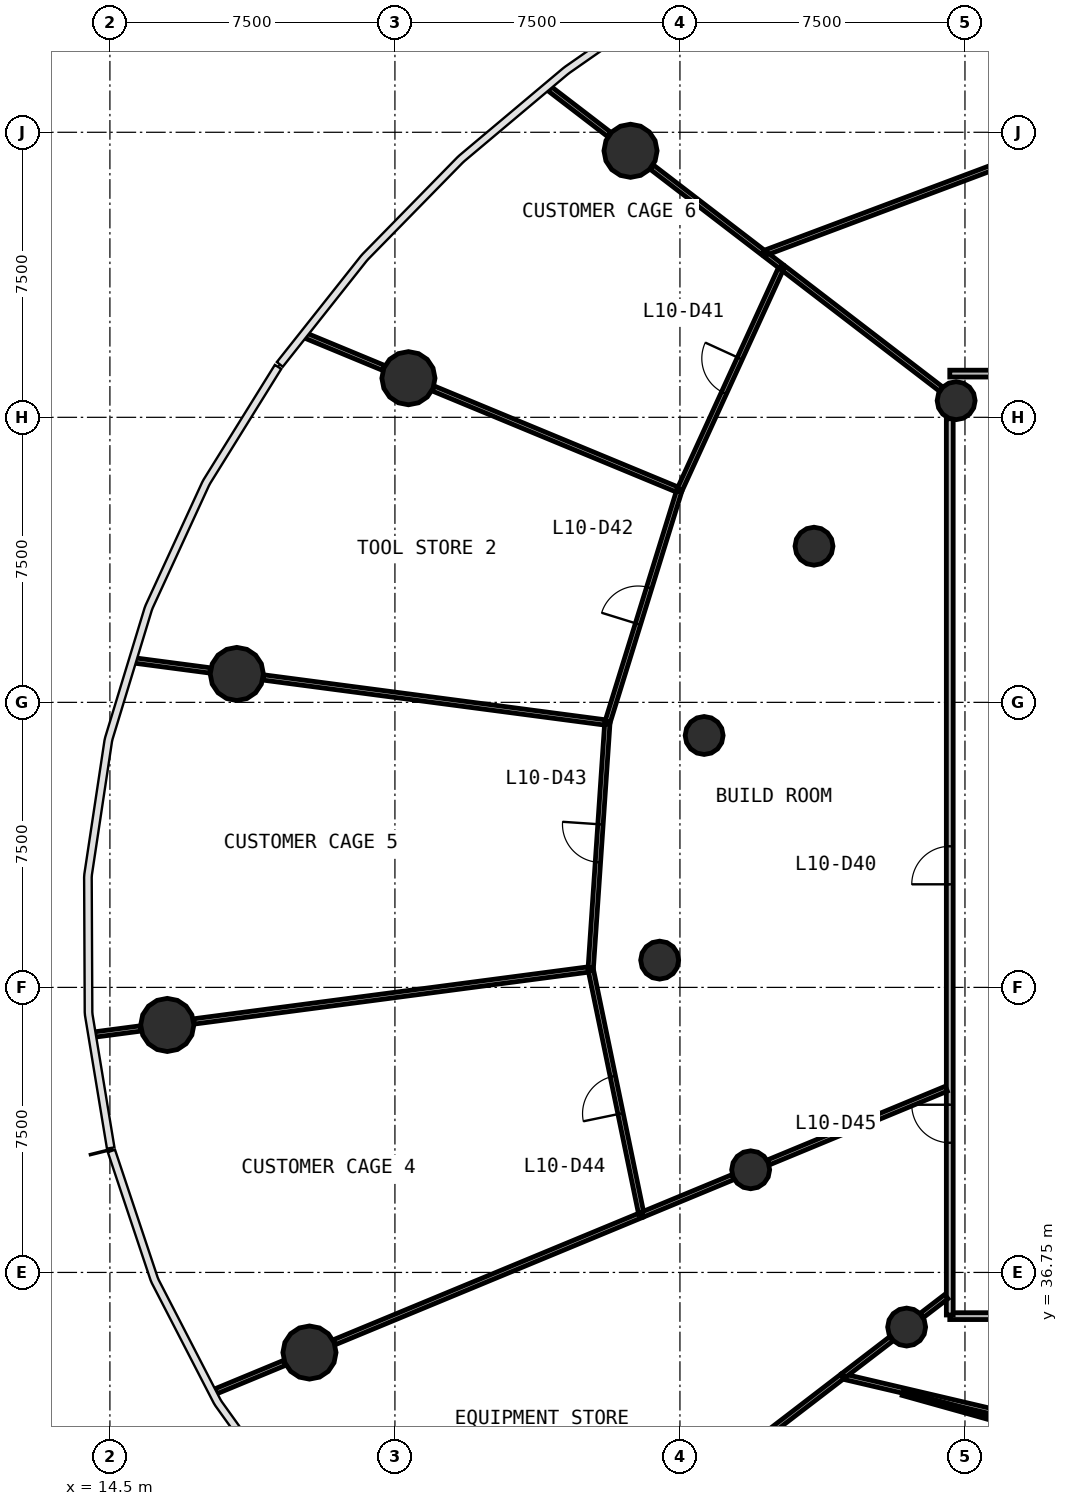
"""IFC4 building model, lengths in metres.
Left out: names, types, materials, properties, quantities, classifications, styles, units other than length and angle.
Written with IfcOpenShell. Run it as: python <this file> out.ifc"""

import sys

from ifc_helpers import new_model, si_unit, direction, frame, frame_2d, origin, origin_2d, place, context, subcontext, project, spatial, rectangle, circle, extrude, source, transform, mapped, element, fill, save


model = new_model("IFC4")
c1 = context("Model", 3, precision=1e-05, world=origin(), true_north=direction((0.0, 1.0)))
c2 = subcontext(c1, "Body", "Model", "MODEL_VIEW")
j1 = project(units=[si_unit("LENGTHUNIT", "METRE"), si_unit("PLANEANGLEUNIT", "RADIAN")], contexts=[c1])
p1 = place(None, origin())
s1 = spatial("IfcSite", under=j1, at=p1, CompositionType="ELEMENT")
p2 = place(p1, origin())
s2 = spatial("IfcBuilding", under=s1, at=p2, CompositionType="ELEMENT")
p3 = place(p2, frame((0.0, 0.0, 44.6)))
s3 = spatial("IfcBuildingStorey", under=s2, at=p3, CompositionType="ELEMENT", Elevation=44.6)
m1 = source(origin(), c2, "Body", "SweptSolid", [
    extrude(circle(Radius=0.7, at=origin_2d()), origin(), (0.0, 0.0, 1.0), 4.4),
])
for number, where, z_axis, x_axis in (
    (1, (28.199, 66.263, 0.0), (0.0, 0.0, 1.0), (1.0, 0.0, 0.0)),
    (2, (22.355, 60.279, 0.0), (0.0, 0.0, 1.0), (1.0, 0.0, 0.0)),
    (3, (17.839, 52.497, 0.0), (0.0, 0.0, 1.0), (1.0, 0.0, 0.0)),
    (4, (16.01, 43.262, 0.0), (0.0, 0.0, 1.0), (1.0, 0.0, 0.0)),
    (5, (19.751, 34.642, 0.0), (0.0, 0.0, 1.0), (1.0, 0.0, 0.0)),
):
    element("IfcColumn", number, at=place(p3, frame(where, z_axis=z_axis, x_axis=x_axis)), inside=s3, PredefinedType="COLUMN", context=c2, shape_type="MappedRepresentation", body=[
        mapped(m1, transform((0.0, 0.0, 0.0), scale=1.0)),
    ])
m2 = source(origin(), c2, "Body", "SweptSolid", [
    extrude(circle(Radius=0.5, at=origin_2d()), origin(), (0.0, 0.0, 1.0), 4.4),
])
for number, where, z_axis, x_axis in (
    (6, (36.768, 59.688, 0.0), (0.0, 0.0, 1.0), (1.0, 0.0, 0.0)),
    (7, (33.028, 55.859, 0.0), (0.0, 0.0, 1.0), (1.0, 0.0, 0.0)),
    (8, (30.137, 50.878, 0.0), (0.0, 0.0, 1.0), (1.0, 0.0, 0.0)),
    (9, (28.966, 44.968, 0.0), (0.0, 0.0, 1.0), (1.0, 0.0, 0.0)),
    (10, (31.361, 39.451, 0.0), (0.0, 0.0, 1.0), (1.0, 0.0, 0.0)),
    (11, (35.465, 35.312, 0.0), (0.0, 0.0, 1.0), (1.0, 0.0, 0.0)),
):
    element("IfcColumn", number, at=place(p3, frame(where, z_axis=z_axis, x_axis=x_axis)), inside=s3, PredefinedType="COLUMN", context=c2, shape_type="MappedRepresentation", body=[
        mapped(m2, transform((0.0, 0.0, 0.0), scale=1.0)),
    ])
p4 = place(p3, frame((67.4, 35.6, 0.0), z_axis=(0.0, 0.0, 1.0), x_axis=(-1.0, 0.0, 0.0)))
e12 = element("IfcWall", 12, at=p4, inside=s3, PredefinedType="PARTITIONING", context=c2, shape_type="SweptSolid", body=[
    extrude(rectangle(XDim=30.8, YDim=0.18, at=frame_2d((15.4, 0.0))), origin(), (0.0, 0.0, 1.0), 3.05),
])
p5 = place(p4, frame((27.45, 0.0, 0.0)))
e13 = element("IfcOpeningElement", 13, at=p5, cuts=e12, PredefinedType="OPENING", context=c2, shape_type="SweptSolid", body=[
    extrude(rectangle(XDim=0.9, YDim=2.1, at=frame_2d((0.45, 1.05))), frame((0.0, 0.1, 0.0), z_axis=(0.0, -1.0, 0.0), x_axis=(1.0, 0.0, 0.0)), (0.0, 0.0, 1.0), 0.2),
])
p6 = place(p4, frame((23.85, 0.0, 0.0)))
e14 = element("IfcOpeningElement", 14, at=p6, cuts=e12, PredefinedType="OPENING", context=c2, shape_type="SweptSolid", body=[
    extrude(rectangle(XDim=0.9, YDim=2.1, at=frame_2d((0.45, 1.05))), frame((0.0, 0.1, 0.0), z_axis=(0.0, -1.0, 0.0), x_axis=(1.0, 0.0, 0.0)), (0.0, 0.0, 1.0), 0.2),
])
p7 = place(p4, frame((20.85, 0.0, 0.0)))
e15 = element("IfcOpeningElement", 15, at=p7, cuts=e12, PredefinedType="OPENING", context=c2, shape_type="SweptSolid", body=[
    extrude(rectangle(XDim=0.9, YDim=2.1, at=frame_2d((0.45, 1.05))), frame((0.0, 0.1, 0.0), z_axis=(0.0, -1.0, 0.0), x_axis=(1.0, 0.0, 0.0)), (0.0, 0.0, 1.0), 0.2),
])
p8 = place(p4, frame((14.95, 0.0, 0.0)))
e16 = element("IfcOpeningElement", 16, at=p8, cuts=e12, PredefinedType="OPENING", context=c2, shape_type="SweptSolid", body=[
    extrude(rectangle(XDim=1.0, YDim=2.1, at=frame_2d((0.5, 1.05))), frame((0.0, 0.1, 0.0), z_axis=(0.0, -1.0, 0.0), x_axis=(1.0, 0.0, 0.0)), (0.0, 0.0, 1.0), 0.2),
])
p9 = place(p3, frame((36.6, 60.4, 0.0), z_axis=(0.0, 0.0, 1.0), x_axis=(1.0, 0.0, 0.0)))
e17 = element("IfcWall", 17, at=p9, inside=s3, PredefinedType="PARTITIONING", context=c2, shape_type="SweptSolid", body=[
    extrude(rectangle(XDim=30.8, YDim=0.18, at=frame_2d((15.4, 0.0))), origin(), (0.0, 0.0, 1.0), 3.05),
])
p10 = place(p9, frame((20.95, 0.0, 0.0)))
e18 = element("IfcOpeningElement", 18, at=p10, cuts=e17, PredefinedType="OPENING", context=c2, shape_type="SweptSolid", body=[
    extrude(rectangle(XDim=1.0, YDim=2.1, at=frame_2d((0.5, 1.05))), frame((0.0, 0.1, 0.0), z_axis=(0.0, -1.0, 0.0), x_axis=(1.0, 0.0, 0.0)), (0.0, 0.0, 1.0), 0.2),
])
p11 = place(p9, frame((17.35, 0.0, 0.0)))
e19 = element("IfcOpeningElement", 19, at=p11, cuts=e17, PredefinedType="OPENING", context=c2, shape_type="SweptSolid", body=[
    extrude(rectangle(XDim=1.0, YDim=2.1, at=frame_2d((0.5, 1.05))), frame((0.0, 0.1, 0.0), z_axis=(0.0, -1.0, 0.0), x_axis=(1.0, 0.0, 0.0)), (0.0, 0.0, 1.0), 0.2),
])
p12 = place(p9, frame((14.95, 0.0, 0.0)))
e20 = element("IfcOpeningElement", 20, at=p12, cuts=e17, PredefinedType="OPENING", context=c2, shape_type="SweptSolid", body=[
    extrude(rectangle(XDim=1.0, YDim=2.1, at=frame_2d((0.5, 1.05))), frame((0.0, 0.1, 0.0), z_axis=(0.0, -1.0, 0.0), x_axis=(1.0, 0.0, 0.0)), (0.0, 0.0, 1.0), 0.2),
])
p13 = place(p3, frame((36.6, 35.63, 0.0), z_axis=(0.0, 0.0, 1.0), x_axis=(0.0, 1.0, 0.0)))
e21 = element("IfcWall", 21, at=p13, inside=s3, PredefinedType="PARTITIONING", context=c2, shape_type="SweptSolid", body=[
    extrude(rectangle(XDim=23.583, YDim=0.18, at=frame_2d((11.791, 0.0))), origin(), (0.0, 0.0, 1.0), 3.05),
])
p14 = place(p13, frame((11.333, 0.0, 0.0)))
e22 = element("IfcOpeningElement", 22, at=p14, cuts=e21, PredefinedType="OPENING", context=c2, shape_type="SweptSolid", body=[
    extrude(rectangle(XDim=1.0, YDim=2.1, at=frame_2d((0.5, 1.05))), frame((0.0, 0.1, 0.0), z_axis=(0.0, -1.0, 0.0), x_axis=(1.0, 0.0, 0.0)), (0.0, 0.0, 1.0), 0.2),
])
p15 = place(p13, frame((4.532, 0.0, 0.0)))
e23 = element("IfcOpeningElement", 23, at=p15, cuts=e21, PredefinedType="OPENING", context=c2, shape_type="SweptSolid", body=[
    extrude(rectangle(XDim=1.0, YDim=2.1, at=frame_2d((0.5, 1.05))), frame((0.0, 0.1, 0.0), z_axis=(0.0, -1.0, 0.0), x_axis=(1.0, 0.0, 0.0)), (0.0, 0.0, 1.0), 0.2),
])
p16 = place(p3, frame((27.151, 44.729, 0.0), z_axis=(0.0, 0.0, 1.0), x_axis=(-0.991445773007, -0.130519267494, 0.0)))
e24 = element("IfcWall", 24, at=p16, inside=s3, PredefinedType="PARTITIONING", context=c2, shape_type="SweptSolid", body=[
    extrude(rectangle(XDim=10.533, YDim=0.14, at=frame_2d((5.267, 0.0))), origin(), (0.0, 0.0, 1.0), 3.05),
])
p17 = place(p3, frame((27.59, 51.214, 0.0), z_axis=(0.0, 0.0, 1.0), x_axis=(-0.991443735441, 0.13053474424, 0.0)))
e25 = element("IfcWall", 25, at=p17, inside=s3, PredefinedType="PARTITIONING", context=c2, shape_type="SweptSolid", body=[
    extrude(rectangle(XDim=9.131, YDim=0.14, at=frame_2d((4.565, 0.0))), origin(), (0.0, 0.0, 1.0), 3.05),
])
p18 = place(p3, frame((33.776, 34.016, 0.0), z_axis=(0.0, 0.0, 1.0), x_axis=(-0.793363616038, -0.608748037161, 0.0)))
e26 = element("IfcWall", 26, at=p18, inside=s3, PredefinedType="PARTITIONING", context=c2, shape_type="SweptSolid", body=[
    extrude(rectangle(XDim=8.889, YDim=0.14, at=frame_2d((4.445, 0.0))), origin(), (0.0, 0.0, 1.0), 3.05),
])
p19 = place(p18, frame((3.85, 0.0, 0.0)))
e27 = element("IfcOpeningElement", 27, at=p19, cuts=e26, PredefinedType="OPENING", context=c2, shape_type="SweptSolid", body=[
    extrude(rectangle(XDim=1.0, YDim=2.1, at=frame_2d((0.5, 1.05))), frame((0.0, 0.08, 0.0), z_axis=(0.0, -1.0, 0.0), x_axis=(1.0, 0.0, 0.0)), (0.0, 0.0, 1.0), 0.16),
])
p20 = place(p3, frame((28.489, 38.261, 0.0), z_axis=(0.0, 0.0, 1.0), x_axis=(-0.923879491354, -0.382683531727, 0.0)))
e28 = element("IfcWall", 28, at=p20, inside=s3, PredefinedType="PARTITIONING", context=c2, shape_type="SweptSolid", body=[
    extrude(rectangle(XDim=8.753, YDim=0.14, at=frame_2d((4.376, 0.0))), origin(), (0.0, 0.0, 1.0), 3.05),
])
p21 = place(p3, frame((29.484, 57.326, 0.0), z_axis=(0.0, 0.0, 1.0), x_axis=(-0.923878476662, 0.3826859814, 0.0)))
e29 = element("IfcWall", 29, at=p21, inside=s3, PredefinedType="PARTITIONING", context=c2, shape_type="SweptSolid", body=[
    extrude(rectangle(XDim=7.011, YDim=0.14, at=frame_2d((3.506, 0.0))), origin(), (0.0, 0.0, 1.0), 3.05),
])
p22 = place(p3, frame((38.19, 65.998, 0.0), z_axis=(0.0, 0.0, 1.0), x_axis=(-0.936297270661, -0.35120851492, 0.0)))
e30 = element("IfcWall", 30, at=p22, inside=s3, PredefinedType="PARTITIONING", context=c2, shape_type="SweptSolid", body=[
    extrude(rectangle(XDim=6.919, YDim=0.14, at=frame_2d((3.459, 0.0))), origin(), (0.0, 0.0, 1.0), 3.05),
])
p23 = place(p3, frame((28.483, 38.291, 0.0), z_axis=(0.0, 0.0, 1.0), x_axis=(-0.202647546794, 0.979251740758, 0.0)))
e31 = element("IfcWall", 31, at=p23, inside=s3, PredefinedType="PARTITIONING", context=c2, shape_type="SweptSolid", body=[
    extrude(rectangle(XDim=6.544, YDim=0.14, at=frame_2d((3.272, 0.0))), origin(), (0.0, 0.0, 1.0), 3.05),
])
p24 = place(p23, frame((2.694, 0.0, 0.0)))
e32 = element("IfcOpeningElement", 32, at=p24, cuts=e31, PredefinedType="OPENING", context=c2, shape_type="SweptSolid", body=[
    extrude(rectangle(XDim=1.0, YDim=2.1, at=frame_2d((0.5, 1.05))), frame((0.0, 0.08, 0.0), z_axis=(0.0, -1.0, 0.0), x_axis=(1.0, 0.0, 0.0)), (0.0, 0.0, 1.0), 0.16),
])
p25 = place(p3, frame((27.153, 44.759, 0.0), z_axis=(0.0, 0.0, 1.0), x_axis=(0.067555628739, 0.997715509063, 0.0)))
e33 = element("IfcWall", 33, at=p25, inside=s3, PredefinedType="PARTITIONING", context=c2, shape_type="SweptSolid", body=[
    extrude(rectangle(XDim=6.44, YDim=0.14, at=frame_2d((3.22, 0.0))), origin(), (0.0, 0.0, 1.0), 3.05),
])
p26 = place(p25, frame((2.79, 0.0, 0.0)))
e34 = element("IfcOpeningElement", 34, at=p26, cuts=e33, PredefinedType="OPENING", context=c2, shape_type="SweptSolid", body=[
    extrude(rectangle(XDim=1.0, YDim=2.1, at=frame_2d((0.5, 1.05))), frame((0.0, 0.08, 0.0), z_axis=(0.0, -1.0, 0.0), x_axis=(1.0, 0.0, 0.0)), (0.0, 0.0, 1.0), 0.16),
])
p27 = place(p3, frame((29.497, 57.354, 0.0), z_axis=(0.0, 0.0, 1.0), x_axis=(0.416308805512, 0.909223283057, 0.0)))
e35 = element("IfcWall", 35, at=p27, inside=s3, PredefinedType="PARTITIONING", context=c2, shape_type="SweptSolid", body=[
    extrude(rectangle(XDim=6.441, YDim=0.14, at=frame_2d((3.22, 0.0))), origin(), (0.0, 0.0, 1.0), 3.05),
])
p28 = place(p27, frame((2.791, 0.0, 0.0)))
e36 = element("IfcOpeningElement", 36, at=p28, cuts=e35, PredefinedType="OPENING", context=c2, shape_type="SweptSolid", body=[
    extrude(rectangle(XDim=1.0, YDim=2.1, at=frame_2d((0.5, 1.05))), frame((0.0, 0.08, 0.0), z_axis=(0.0, -1.0, 0.0), x_axis=(1.0, 0.0, 0.0)), (0.0, 0.0, 1.0), 0.16),
])
p29 = place(p3, frame((27.599, 51.242, 0.0), z_axis=(0.0, 0.0, 1.0), x_axis=(0.296066096507, 0.95516745469, 0.0)))
e37 = element("IfcWall", 37, at=p29, inside=s3, PredefinedType="PARTITIONING", context=c2, shape_type="SweptSolid", body=[
    extrude(rectangle(XDim=6.34, YDim=0.14, at=frame_2d((3.17, 0.0))), origin(), (0.0, 0.0, 1.0), 3.05),
])
p30 = place(p29, frame((2.689, 0.0, 0.0)))
e38 = element("IfcOpeningElement", 38, at=p30, cuts=e37, PredefinedType="OPENING", context=c2, shape_type="SweptSolid", body=[
    extrude(rectangle(XDim=1.0, YDim=2.1, at=frame_2d((0.5, 1.05))), frame((0.0, 0.08, 0.0), z_axis=(0.0, -1.0, 0.0), x_axis=(1.0, 0.0, 0.0)), (0.0, 0.0, 1.0), 0.16),
])
p31 = place(p3, frame((33.805, 34.009, 0.0), z_axis=(0.0, 0.0, 1.0), x_axis=(0.973632222489, -0.22812342127, 0.0)))
e39 = element("IfcWall", 39, at=p31, inside=s3, PredefinedType="PARTITIONING", context=c2, shape_type="SweptSolid", body=[
    extrude(rectangle(XDim=6.018, YDim=0.14, at=frame_2d((3.009, 0.0))), origin(), (0.0, 0.0, 1.0), 3.05),
])
p32 = place(p3, frame((36.367, 59.995, 0.0), z_axis=(0.0, 0.0, 1.0), x_axis=(-0.793353550187, 0.608761155467, 0.0)))
e40 = element("IfcWall", 40, at=p32, inside=s3, PredefinedType="PARTITIONING", context=c2, shape_type="SweptSolid", body=[
    extrude(rectangle(XDim=5.208, YDim=0.14, at=frame_2d((2.604, 0.0))), origin(), (0.0, 0.0, 1.0), 3.05),
])
p33 = place(p3, frame((36.51, 41.584, 0.0), z_axis=(0.0, 0.0, 1.0), x_axis=(-0.923890025086, -0.382658100067, 0.0)))
e41 = element("IfcWall", 41, at=p33, inside=s3, PredefinedType="PARTITIONING", context=c2, shape_type="SweptSolid", body=[
    extrude(rectangle(XDim=5.068, YDim=0.14, at=frame_2d((2.534, 0.0))), origin(), (0.0, 0.0, 1.0), 3.05),
])
p34 = place(p3, frame((31.688, 63.586, 0.0), z_axis=(0.0, 0.0, 1.0), x_axis=(-0.793375408023, 0.608732668701, 0.0)))
e42 = element("IfcWall", 42, at=p34, inside=s3, PredefinedType="PARTITIONING", context=c2, shape_type="SweptSolid", body=[
    extrude(rectangle(XDim=3.693, YDim=0.14, at=frame_2d((1.847, 0.0))), origin(), (0.0, 0.0, 1.0), 3.05),
])
p35 = place(p3, frame((30.894, 39.258, 0.0), z_axis=(0.0, 0.0, 1.0), x_axis=(-0.923866506459, -0.382714878523, 0.0)))
e43 = element("IfcWall", 43, at=p35, inside=s3, PredefinedType="PARTITIONING", context=c2, shape_type="SweptSolid", body=[
    extrude(rectangle(XDim=2.573, YDim=0.14, at=frame_2d((1.287, 0.0))), origin(), (0.0, 0.0, 1.0), 3.05),
])
p36 = place(p3, frame((21.704, 60.549, 0.0), z_axis=(0.0, 0.0, 1.0), x_axis=(-0.923899948789, 0.382634139392, 0.0)))
e44 = element("IfcWall", 44, at=p36, inside=s3, PredefinedType="PARTITIONING", context=c2, shape_type="SweptSolid", body=[
    extrude(rectangle(XDim=2.215, YDim=0.14, at=frame_2d((1.107, 0.0))), origin(), (0.0, 0.0, 1.0), 3.05),
])
p37 = place(p3, frame((17.141, 52.589, 0.0), z_axis=(0.0, 0.0, 1.0), x_axis=(-0.991443960057, 0.130533038219, 0.0)))
e45 = element("IfcWall", 45, at=p37, inside=s3, PredefinedType="PARTITIONING", context=c2, shape_type="SweptSolid", body=[
    extrude(rectangle(XDim=2.01, YDim=0.14, at=frame_2d((1.005, 0.0))), origin(), (0.0, 0.0, 1.0), 3.05),
])
p38 = place(p3, frame((27.641, 66.691, 0.0), z_axis=(0.0, 0.0, 1.0), x_axis=(-0.793312100237, 0.608815170325, 0.0)))
e46 = element("IfcWall", 46, at=p38, inside=s3, PredefinedType="PARTITIONING", context=c2, shape_type="SweptSolid", body=[
    extrude(rectangle(XDim=1.977, YDim=0.14, at=frame_2d((0.989, 0.0))), origin(), (0.0, 0.0, 1.0), 3.05),
])
p39 = place(p3, frame((19.1, 34.372, 0.0), z_axis=(0.0, 0.0, 1.0), x_axis=(-0.923874199787, -0.382696306447, 0.0)))
e47 = element("IfcWall", 47, at=p39, inside=s3, PredefinedType="PARTITIONING", context=c2, shape_type="SweptSolid", body=[
    extrude(rectangle(XDim=1.961, YDim=0.14, at=frame_2d((0.98, 0.0))), origin(), (0.0, 0.0, 1.0), 3.05),
])
p40 = place(p3, frame((35.065, 35.005, 0.0), z_axis=(0.0, 0.0, 1.0), x_axis=(-0.793286864057, -0.608848052732, 0.0)))
e48 = element("IfcWall", 48, at=p40, inside=s3, PredefinedType="PARTITIONING", context=c2, shape_type="SweptSolid", body=[
    extrude(rectangle(XDim=1.587, YDim=0.14, at=frame_2d((0.793, 0.0))), origin(), (0.0, 0.0, 1.0), 3.05),
])
p41 = place(p3, frame((15.311, 43.17, 0.0), z_axis=(0.0, 0.0, 1.0), x_axis=(-0.991424298155, -0.130682290411, 0.0)))
e49 = element("IfcWall", 49, at=p41, inside=s3, PredefinedType="PARTITIONING", context=c2, shape_type="SweptSolid", body=[
    extrude(rectangle(XDim=1.22, YDim=0.14, at=frame_2d((0.61, 0.0))), origin(), (0.0, 0.0, 1.0), 3.05),
])
p42 = place(p3, frame((36.51, 36.114, 0.0), z_axis=(0.0, 0.0, 1.0), x_axis=(-0.793316076519, -0.608809989025, 0.0)))
e50 = element("IfcWall", 50, at=p42, inside=s3, PredefinedType="PARTITIONING", context=c2, shape_type="SweptSolid", body=[
    extrude(rectangle(XDim=0.812, YDim=0.14, at=frame_2d((0.406, 0.0))), origin(), (0.0, 0.0, 1.0), 3.05),
])
p43 = place(p3, frame((32.155, 63.228, 0.0), z_axis=(0.0, 0.0, 1.0), x_axis=(-0.793176766219, 0.608991475745, 0.0)))
e51 = element("IfcWall", 51, at=p43, inside=s3, PredefinedType="PARTITIONING", context=c2, shape_type="SweptSolid", body=[
    extrude(rectangle(XDim=0.476, YDim=0.14, at=frame_2d((0.238, 0.0))), origin(), (0.0, 0.0, 1.0), 3.05),
])
p44 = place(p3, frame((35.364, 33.572, 0.0), z_axis=(0.0, 0.0, 1.0), x_axis=(0.963049305084, -0.269325149172, 0.0)))
e52 = element("IfcWall", 52, at=p44, inside=s3, PredefinedType="PARTITIONING", context=c2, shape_type="SweptSolid", body=[
    extrude(rectangle(XDim=2.823, YDim=0.12, at=frame_2d((1.411, 0.0))), origin(), (0.0, 0.0, 1.0), 3.05),
])
m3 = source(origin(), c2, "Body", "SweptSolid", [
    extrude(rectangle(XDim=1.0, YDim=2.1, at=frame_2d((0.5, 1.05))), frame((0.0, 0.025, 0.0), z_axis=(0.0, -1.0, 0.0), x_axis=(1.0, 0.0, 0.0)), (0.0, 0.0, 1.0), 0.05),
])
p45 = place(p14, origin())
e53 = element("IfcDoor", 53, at=p45, inside=s3, OperationType="SINGLE_SWING_LEFT", PredefinedType="DOOR", context=c2, shape_type="MappedRepresentation", body=[
    mapped(m3, transform((0.0, 0.0, 0.0), scale=1.0)),
])
fill(e22, e53)
p46 = place(p28, origin())
e54 = element("IfcDoor", 54, at=p46, inside=s3, OperationType="SINGLE_SWING_RIGHT", PredefinedType="DOOR", context=c2, shape_type="MappedRepresentation", body=[
    mapped(m3, transform((0.0, 0.0, 0.0), scale=1.0)),
])
fill(e36, e54)
p47 = place(p30, origin())
e55 = element("IfcDoor", 55, at=p47, inside=s3, OperationType="SINGLE_SWING_LEFT", PredefinedType="DOOR", context=c2, shape_type="MappedRepresentation", body=[
    mapped(m3, transform((0.0, 0.0, 0.0), scale=1.0)),
])
fill(e38, e55)
p48 = place(p26, origin())
e56 = element("IfcDoor", 56, at=p48, inside=s3, OperationType="SINGLE_SWING_RIGHT", PredefinedType="DOOR", context=c2, shape_type="MappedRepresentation", body=[
    mapped(m3, transform((0.0, 0.0, 0.0), scale=1.0)),
])
fill(e34, e56)
p49 = place(p24, origin())
e57 = element("IfcDoor", 57, at=p49, inside=s3, OperationType="SINGLE_SWING_LEFT", PredefinedType="DOOR", context=c2, shape_type="MappedRepresentation", body=[
    mapped(m3, transform((0.0, 0.0, 0.0), scale=1.0)),
])
fill(e32, e57)
p50 = place(p15, origin())
e58 = element("IfcDoor", 58, at=p50, inside=s3, OperationType="SINGLE_SWING_RIGHT", PredefinedType="DOOR", context=c2, shape_type="MappedRepresentation", body=[
    mapped(m3, transform((0.0, 0.0, 0.0), scale=1.0)),
])
fill(e23, e58)
save(model, sys.argv[1])
